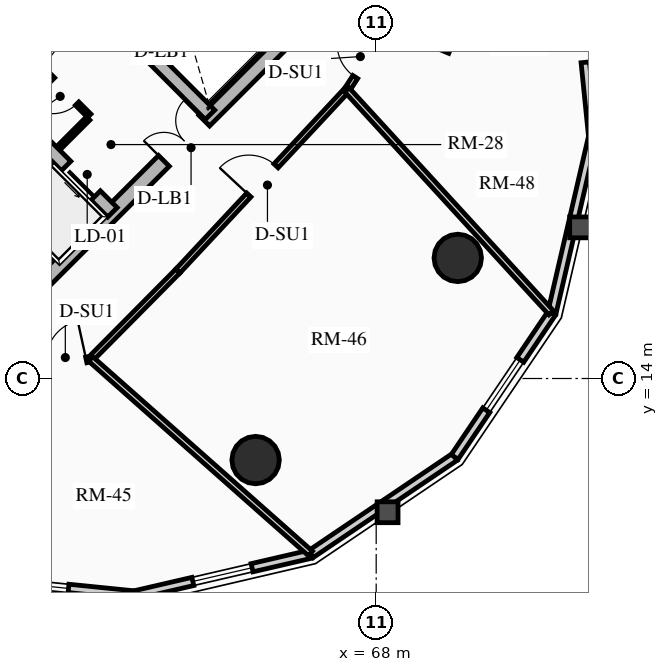
"""IFC4 building model, lengths in metres.
Left out: names, types, materials, properties, quantities, classifications, styles, units other than length and angle.
Written with IfcOpenShell. Run it as: python <this file> out.ifc"""

import sys

from ifc_helpers import new_model, si_unit, direction, frame, frame_2d, origin, origin_2d, place, context, subcontext, project, spatial, rectangle, circle, extrude, source, transform, mapped, element, fill, save


model = new_model("IFC4")
c1 = context("Model", 3, precision=1e-05, world=origin(), true_north=direction((0.0, 1.0)))
c2 = subcontext(c1, "Body", "Model", "MODEL_VIEW")
j1 = project(units=[si_unit("LENGTHUNIT", "METRE"), si_unit("PLANEANGLEUNIT", "RADIAN")], contexts=[c1])
p1 = place(None, origin())
s1 = spatial("IfcSite", under=j1, at=p1, CompositionType="ELEMENT")
p2 = place(p1, origin())
s2 = spatial("IfcBuilding", under=s1, at=p2, CompositionType="ELEMENT")
p3 = place(p2, frame((0.0, 0.0, 154.51)))
s3 = spatial("IfcBuildingStorey", under=s2, at=p3, CompositionType="ELEMENT", Elevation=154.51)
p4 = place(p3, frame((58.561, 15.873, 0.0), z_axis=(0.0, 0.0, 1.0), x_axis=(0.707106781187, 0.707106781187, 0.0)))
e1 = element("IfcWall", 1, at=p4, inside=s3, PredefinedType="SHEAR", context=c2, shape_type="SweptSolid", body=[
    extrude(rectangle(XDim=10.7, YDim=0.4, at=frame_2d((5.35, 0.0))), origin(), (0.0, 0.0, 1.0), 2.91),
])
m1 = source(origin(), c2, "Body", "SweptSolid", [
    extrude(rectangle(XDim=1.5, YDim=2.02, at=frame_2d((0.75, 1.01))), frame((0.0, 0.21, 0.0), z_axis=(0.0, -1.0, 0.0), x_axis=(1.0, 0.0, 0.0)), (0.0, 0.0, 1.0), 0.42),
])
p5 = place(p4, frame((5.45, 0.0, 0.0)))
e2 = element("IfcOpeningElement", 2, at=p5, cuts=e1, PredefinedType="OPENING", context=c2, shape_type="MappedRepresentation", body=[
    mapped(m1, transform((0.0, 0.0, 0.0), x_axis=(1.0, 0.0, 0.0), y_axis=(0.0, 1.0, 0.0), z_axis=(0.0, 0.0, 1.0), scale=1.0)),
])
p6 = place(p3, frame((61.06, 18.373, 0.0), z_axis=(0.0, 0.0, 1.0), x_axis=(-0.707106781187, 0.707106781187, 0.0)))
e3 = element("IfcWall", 3, at=p6, inside=s3, PredefinedType="SHEAR", context=c2, shape_type="SweptSolid", body=[
    extrude(rectangle(XDim=13.7, YDim=0.35, at=frame_2d((6.85, 0.0))), origin(), (0.0, 0.0, 1.0), 2.91),
])
m2 = source(origin(), c2, "Body", "SweptSolid", [
    extrude(rectangle(XDim=1.1, YDim=2.015, at=frame_2d((0.55, 1.007))), frame((0.0, 0.185, 0.0), z_axis=(0.0, -1.0, 0.0), x_axis=(1.0, 0.0, 0.0)), (0.0, 0.0, 1.0), 0.37),
])
p7 = place(p6, frame((4.85, 0.0, 0.0)))
e4 = element("IfcOpeningElement", 4, at=p7, cuts=e3, PredefinedType="OPENING", context=c2, shape_type="MappedRepresentation", body=[
    mapped(m2, transform((0.0, 0.0, 0.0), x_axis=(1.0, 0.0, 0.0), y_axis=(0.0, 1.0, 0.0), z_axis=(0.0, 0.0, 1.0), scale=1.0)),
])
p8 = place(p6, frame((0.625, 0.0, 0.0)))
e5 = element("IfcOpeningElement", 5, at=p8, cuts=e3, PredefinedType="OPENING", context=c2, shape_type="MappedRepresentation", body=[
    mapped(m2, transform((0.0, 0.0, 0.0), x_axis=(1.0, 0.0, 0.0), y_axis=(0.0, 1.0, 0.0), z_axis=(0.0, 0.0, 1.0), scale=1.0)),
])
p9 = place(p6, frame((2.625, 0.0, 0.0)))
e6 = element("IfcOpeningElement", 6, at=p9, cuts=e3, PredefinedType="OPENING", context=c2, shape_type="MappedRepresentation", body=[
    mapped(m2, transform((0.0, 0.0, 0.0), x_axis=(1.0, 0.0, 0.0), y_axis=(0.0, 1.0, 0.0), z_axis=(0.0, 0.0, 1.0), scale=1.0)),
])
m3 = source(origin(), c2, "Body", "SweptSolid", [
    extrude(rectangle(XDim=1.15, YDim=2.02, at=frame_2d((0.575, 1.01))), frame((0.0, 0.185, 0.0), z_axis=(0.0, -1.0, 0.0), x_axis=(1.0, 0.0, 0.0)), (0.0, 0.0, 1.0), 0.37),
])
p10 = place(p6, frame((7.27, 0.0, 0.0)))
e7 = element("IfcOpeningElement", 7, at=p10, cuts=e3, PredefinedType="OPENING", context=c2, shape_type="MappedRepresentation", body=[
    mapped(m3, transform((0.0, 0.0, 0.0), x_axis=(1.0, 0.0, 0.0), y_axis=(0.0, 1.0, 0.0), z_axis=(0.0, 0.0, 1.0), scale=1.0)),
])
p11 = place(p3, frame((63.627, 20.94, 0.0), z_axis=(0.0, 0.0, 1.0), x_axis=(-0.707119496762, 0.707094065383, 0.0)))
e8 = element("IfcWall", 8, at=p11, inside=s3, PredefinedType="SHEAR", context=c2, shape_type="SweptSolid", body=[
    extrude(rectangle(XDim=9.6, YDim=0.35, at=frame_2d((4.8, 0.0))), origin(), (0.0, 0.0, 1.0), 2.91),
])
p12 = place(p11, frame((5.28, 0.0, 0.0)))
e9 = element("IfcOpeningElement", 9, at=p12, cuts=e8, PredefinedType="OPENING", context=c2, shape_type="MappedRepresentation", body=[
    mapped(m3, transform((0.0, 0.0, 0.0), x_axis=(1.0, 0.0, 0.0), y_axis=(0.0, 1.0, 0.0), z_axis=(0.0, 0.0, 1.0), scale=1.0)),
])
for number, where, z_axis, x_axis in (
    (10, (64.827, 11.854, 0.0), (0.0, 0.0, 1.0), (1.0, 0.0, 0.0)),
    (11, (70.146, 17.173, 0.0), (0.0, 0.0, 1.0), (1.0, 0.0, 0.0)),
):
    element("IfcColumn", number, at=place(p3, frame(where, z_axis=z_axis, x_axis=x_axis)), inside=s3, PredefinedType="USERDEFINED", context=c2, shape_type="SweptSolid", body=[
        extrude(circle(Radius=0.625, at=origin_2d()), origin(), (0.0, 0.0, 1.0), 2.91),
    ])
p13 = place(p3, frame((61.633, 8.302, 0.0), z_axis=(0.0, 0.0, 1.0), x_axis=(-0.994959267396, 0.100279889424, 0.0)))
e12 = element("IfcWall", 12, at=p13, inside=s3, PredefinedType="SOLIDWALL", context=c2, shape_type="SweptSolid", body=[
    extrude(rectangle(XDim=5.076, YDim=0.22, at=frame_2d((2.538, 0.0))), origin(), (0.0, 0.0, 1.0), 2.245),
])
m4 = source(origin(), c2, "Body", "SweptSolid", [
    extrude(rectangle(XDim=1.6, YDim=1.3, at=frame_2d((0.8, 0.65))), frame((0.0, 0.12, 0.0), z_axis=(0.0, -1.0, 0.0), x_axis=(1.0, 0.0, 0.0)), (0.0, 0.0, 1.0), 0.24),
])
p14 = place(p13, frame((1.738, 0.0, 0.65)))
e13 = element("IfcOpeningElement", 13, at=p14, cuts=e12, PredefinedType="OPENING", context=c2, shape_type="MappedRepresentation", body=[
    mapped(m4, transform((0.0, 0.0, 0.0), x_axis=(1.0, 0.0, 0.0), y_axis=(0.0, 1.0, 0.0), z_axis=(0.0, 0.0, 1.0), scale=1.0)),
])
p15 = place(p3, frame((66.279, 9.378, 0.0), z_axis=(0.0, 0.0, 1.0), x_axis=(-0.974206226622, -0.225659540039, 0.0)))
e14 = element("IfcWall", 14, at=p15, inside=s3, PredefinedType="SOLIDWALL", context=c2, shape_type="SweptSolid", body=[
    extrude(rectangle(XDim=4.769, YDim=0.22, at=frame_2d((2.385, 0.0))), origin(), (0.0, 0.0, 1.0), 2.245),
])
p16 = place(p15, frame((1.585, 0.0, 0.65)))
e15 = element("IfcOpeningElement", 15, at=p16, cuts=e14, PredefinedType="OPENING", context=c2, shape_type="MappedRepresentation", body=[
    mapped(m4, transform((0.0, 0.0, 0.0), x_axis=(1.0, 0.0, 0.0), y_axis=(0.0, 1.0, 0.0), z_axis=(0.0, 0.0, 1.0), scale=1.0)),
])
p17 = place(p3, frame((70.065, 11.935, 0.0), z_axis=(0.0, 0.0, 1.0), x_axis=(-0.828739009952, -0.559635286042, 0.0)))
e16 = element("IfcWall", 16, at=p17, inside=s3, PredefinedType="SOLIDWALL", context=c2, shape_type="SweptSolid", body=[
    extrude(rectangle(XDim=4.569, YDim=0.22, at=frame_2d((2.284, 0.0))), origin(), (0.0, 0.0, 1.0), 2.245),
])
p18 = place(p3, frame((72.622, 15.721, 0.0), z_axis=(0.0, 0.0, 1.0), x_axis=(-0.559635286042, -0.828739009952, 0.0)))
e17 = element("IfcWall", 17, at=p18, inside=s3, PredefinedType="SOLIDWALL", context=c2, shape_type="SweptSolid", body=[
    extrude(rectangle(XDim=4.569, YDim=0.22, at=frame_2d((2.284, 0.0))), origin(), (0.0, 0.0, 1.0), 2.245),
])
p19 = place(p18, frame((1.484, 0.0, 0.65)))
e18 = element("IfcOpeningElement", 18, at=p19, cuts=e17, PredefinedType="OPENING", context=c2, shape_type="MappedRepresentation", body=[
    mapped(m4, transform((0.0, 0.0, 0.0), x_axis=(1.0, 0.0, 0.0), y_axis=(0.0, 1.0, 0.0), z_axis=(0.0, 0.0, 1.0), scale=1.0)),
])
p20 = place(p3, frame((73.698, 20.367, 0.0), z_axis=(0.0, 0.0, 1.0), x_axis=(-0.225659540039, -0.974206226622, 0.0)))
e19 = element("IfcWall", 19, at=p20, inside=s3, PredefinedType="SOLIDWALL", context=c2, shape_type="SweptSolid", body=[
    extrude(rectangle(XDim=4.769, YDim=0.22, at=frame_2d((2.385, 0.0))), origin(), (0.0, 0.0, 1.0), 2.245),
])
p21 = place(p3, frame((73.189, 25.418, 0.0), z_axis=(0.0, 0.0, 1.0), x_axis=(0.100279889424, -0.994959267396, 0.0)))
e20 = element("IfcWall", 20, at=p21, inside=s3, PredefinedType="SOLIDWALL", context=c2, shape_type="SweptSolid", body=[
    extrude(rectangle(XDim=5.076, YDim=0.22, at=frame_2d((2.538, 0.0))), origin(), (0.0, 0.0, 1.0), 2.245),
])
m5 = source(origin(), c2, "Body", "SweptSolid", [
    extrude(rectangle(XDim=1.15, YDim=2.005, at=frame_2d((0.575, 1.002))), frame((0.0, 0.12, 0.0), z_axis=(0.0, -1.0, 0.0), x_axis=(1.0, 0.0, 0.0)), (0.0, 0.0, 1.0), 0.24),
])
p22 = place(p21, frame((1.963, 0.0, 0.0)))
e21 = element("IfcOpeningElement", 21, at=p22, cuts=e20, PredefinedType="OPENING", context=c2, shape_type="MappedRepresentation", body=[
    mapped(m5, transform((0.0, 0.0, 0.0), x_axis=(1.0, 0.0, 0.0), y_axis=(0.0, 1.0, 0.0), z_axis=(0.0, 0.0, 1.0), scale=1.0)),
])
p23 = place(p3, frame((58.214, 21.467, 0.0), z_axis=(0.0, 0.0, 1.0), x_axis=(0.707106781187, 0.707106781187, 0.0)))
e22 = element("IfcWall", 22, at=p23, inside=s3, PredefinedType="PARTITIONING", context=c2, shape_type="SweptSolid", body=[
    extrude(rectangle(XDim=3.28, YDim=0.2, at=frame_2d((1.64, 0.0))), origin(), (0.0, 0.0, 1.0), 2.675),
])
m6 = source(origin(), c2, "Body", "SweptSolid", [
    extrude(rectangle(XDim=1.5, YDim=2.02, at=frame_2d((0.75, 1.01))), frame((0.0, 0.11, 0.0), z_axis=(0.0, -1.0, 0.0), x_axis=(1.0, 0.0, 0.0)), (0.0, 0.0, 1.0), 0.22),
])
p24 = place(p23, frame((1.55, 0.0, 0.0)))
e23 = element("IfcOpeningElement", 23, at=p24, cuts=e22, PredefinedType="OPENING", context=c2, shape_type="MappedRepresentation", body=[
    mapped(m6, transform((0.0, 0.0, 0.0), x_axis=(1.0, 0.0, 0.0), y_axis=(0.0, 1.0, 0.0), z_axis=(0.0, 0.0, 1.0), scale=1.0)),
])
p25 = place(p3, frame((60.448, 20.915, 0.0), z_axis=(0.0, 0.0, 1.0), x_axis=(-0.707106781187, 0.707106781187, 0.0)))
e24 = element("IfcWall", 24, at=p25, inside=s3, PredefinedType="PARTITIONING", context=c2, shape_type="SweptSolid", body=[
    extrude(rectangle(XDim=1.87, YDim=0.125, at=frame_2d((0.935, 0.0))), origin(), (0.0, 0.0, 1.0), 2.675),
])
m7 = source(origin(), c2, "Body", "SweptSolid", [
    extrude(rectangle(XDim=0.9, YDim=2.005, at=frame_2d((0.45, 1.002))), frame((0.0, 0.073, 0.0), z_axis=(0.0, -1.0, 0.0), x_axis=(1.0, 0.0, 0.0)), (0.0, 0.0, 1.0), 0.145),
])
p26 = place(p25, frame((0.45, 0.0, 0.0)))
e25 = element("IfcOpeningElement", 25, at=p26, cuts=e24, PredefinedType="OPENING", context=c2, shape_type="MappedRepresentation", body=[
    mapped(m7, transform((0.0, 0.0, 0.0), x_axis=(1.0, 0.0, 0.0), y_axis=(0.0, 1.0, 0.0), z_axis=(0.0, 0.0, 1.0), scale=1.0)),
])
p27 = place(p3, frame((59.643, 20.066, 0.0), z_axis=(0.0, 0.0, 1.0), x_axis=(0.707106781187, 0.707106781187, 0.0)))
e26 = element("IfcWall", 26, at=p27, inside=s3, PredefinedType="PARTITIONING", context=c2, shape_type="SweptSolid", body=[
    extrude(rectangle(XDim=1.1, YDim=0.125, at=frame_2d((0.55, 0.0))), origin(), (0.0, 0.0, 1.0), 2.675),
])
p28 = place(p3, frame((58.963, 14.18, 0.0), z_axis=(0.0, 0.0, 1.0), x_axis=(0.976826524015, 0.214032572243, 0.0)))
e27 = element("IfcWall", 27, at=p28, inside=s3, PredefinedType="PARTITIONING", context=c2, shape_type="SweptSolid", body=[
    extrude(rectangle(XDim=1.562, YDim=0.15, at=frame_2d((0.781, 0.0))), origin(), (0.0, 0.0, 1.0), 2.245),
])
m8 = source(origin(), c2, "Body", "SweptSolid", [
    extrude(rectangle(XDim=1.05, YDim=2.015, at=frame_2d((0.525, 1.007))), frame((0.0, 0.085, 0.0), z_axis=(0.0, -1.0, 0.0), x_axis=(1.0, 0.0, 0.0)), (0.0, 0.0, 1.0), 0.17),
])
p29 = place(p28, frame((0.392, 0.0, 0.0)))
e28 = element("IfcOpeningElement", 28, at=p29, cuts=e27, PredefinedType="OPENING", context=c2, shape_type="MappedRepresentation", body=[
    mapped(m8, transform((0.0, 0.0, 0.0), x_axis=(1.0, 0.0, 0.0), y_axis=(0.0, 1.0, 0.0), z_axis=(0.0, 0.0, 1.0), scale=1.0)),
])
p30 = place(p3, frame((60.488, 14.514, 0.0), z_axis=(0.0, 0.0, 1.0), x_axis=(0.703880260405, 0.71031864611, 0.0)))
e29 = element("IfcWall", 29, at=p30, inside=s3, PredefinedType="PARTITIONING", context=c2, shape_type="SweptSolid", body=[
    extrude(rectangle(XDim=3.261, YDim=0.15, at=frame_2d((1.63, 0.0))), origin(), (0.0, 0.0, 1.0), 2.245),
])
p31 = place(p3, frame((62.784, 16.83, 0.0), z_axis=(0.0, 0.0, 1.0), x_axis=(0.682240832942, 0.731127516831, 0.0)))
e30 = element("IfcWall", 30, at=p31, inside=s3, PredefinedType="PARTITIONING", context=c2, shape_type="SweptSolid", body=[
    extrude(rectangle(XDim=6.517, YDim=0.15, at=frame_2d((3.259, 0.0))), origin(), (0.0, 0.0, 1.0), 2.245),
])
p32 = place(p31, frame((2.734, 0.0, 0.0)))
e31 = element("IfcOpeningElement", 31, at=p32, cuts=e30, PredefinedType="OPENING", context=c2, shape_type="MappedRepresentation", body=[
    mapped(m8, transform((0.0, 0.0, 0.0), x_axis=(1.0, 0.0, 0.0), y_axis=(0.0, 1.0, 0.0), z_axis=(0.0, 0.0, 1.0), scale=1.0)),
])
p33 = place(p3, frame((67.23, 21.595, 0.0), z_axis=(0.0, 0.0, 1.0), x_axis=(0.543687770222, 0.839287560084, 0.0)))
e32 = element("IfcWall", 32, at=p33, inside=s3, PredefinedType="PARTITIONING", context=c2, shape_type="SweptSolid", body=[
    extrude(rectangle(XDim=1.855, YDim=0.15, at=frame_2d((0.927, 0.0))), origin(), (0.0, 0.0, 1.0), 2.245),
])
p34 = place(p33, frame((0.402, 0.0, 0.0)))
e33 = element("IfcOpeningElement", 33, at=p34, cuts=e32, PredefinedType="OPENING", context=c2, shape_type="MappedRepresentation", body=[
    mapped(m8, transform((0.0, 0.0, 0.0), x_axis=(1.0, 0.0, 0.0), y_axis=(0.0, 1.0, 0.0), z_axis=(0.0, 0.0, 1.0), scale=1.0)),
])
p35 = place(p3, frame((60.488, 14.514, 0.0), z_axis=(0.0, 0.0, 1.0), x_axis=(0.748740614849, -0.662863101761, 0.0)))
e34 = element("IfcWall", 34, at=p35, inside=s3, PredefinedType="PARTITIONING", context=c2, shape_type="SweptSolid", body=[
    extrude(rectangle(XDim=7.721, YDim=0.16, at=frame_2d((3.861, 0.0))), origin(), (0.0, 0.0, 1.0), 2.245),
])
p36 = place(p3, frame((67.23, 21.595, 0.0), z_axis=(0.0, 0.0, 1.0), x_axis=(0.67560509773, -0.737263692258, 0.0)))
e35 = element("IfcWall", 35, at=p36, inside=s3, PredefinedType="PARTITIONING", context=c2, shape_type="SweptSolid", body=[
    extrude(rectangle(XDim=7.955, YDim=0.16, at=frame_2d((3.978, 0.0))), origin(), (0.0, 0.0, 1.0), 2.245),
])
p37 = place(p3, frame((68.367, 23.271, 0.0), z_axis=(0.0, 0.0, 1.0), x_axis=(0.922420747941, -0.386186436541, 0.0)))
e36 = element("IfcWall", 36, at=p37, inside=s3, PredefinedType="PARTITIONING", context=c2, shape_type="SweptSolid", body=[
    extrude(rectangle(XDim=1.699, YDim=0.125, at=frame_2d((0.849, 0.0))), origin(), (0.0, 0.0, 1.0), 2.675),
])
m9 = source(origin(), c2, "Body", "SweptSolid", [
    extrude(rectangle(XDim=1.6, YDim=1.3, at=frame_2d((0.8, 0.65))), frame((0.0, 0.03, 0.0), z_axis=(0.0, -1.0, 0.0), x_axis=(1.0, 0.0, 0.0)), (0.0, 0.0, 1.0), 0.06),
])
p38 = place(p14, origin())
e37 = element("IfcWindow", 37, at=p38, inside=s3, PartitioningType="SINGLE_PANEL", PredefinedType="WINDOW", context=c2, shape_type="MappedRepresentation", body=[
    mapped(m9, transform((0.0, 0.0, 0.0), x_axis=(1.0, 0.0, 0.0), y_axis=(0.0, 1.0, 0.0), z_axis=(0.0, 0.0, 1.0), scale=1.0)),
])
fill(e13, e37)
p39 = place(p16, origin())
e38 = element("IfcWindow", 38, at=p39, inside=s3, PartitioningType="SINGLE_PANEL", PredefinedType="WINDOW", context=c2, shape_type="MappedRepresentation", body=[
    mapped(m9, transform((0.0, 0.0, 0.0), x_axis=(1.0, 0.0, 0.0), y_axis=(0.0, 1.0, 0.0), z_axis=(0.0, 0.0, 1.0), scale=1.0)),
])
fill(e15, e38)
p40 = place(p19, origin())
e39 = element("IfcWindow", 39, at=p40, inside=s3, PartitioningType="SINGLE_PANEL", PredefinedType="WINDOW", context=c2, shape_type="MappedRepresentation", body=[
    mapped(m9, transform((0.0, 0.0, 0.0), x_axis=(1.0, 0.0, 0.0), y_axis=(0.0, 1.0, 0.0), z_axis=(0.0, 0.0, 1.0), scale=1.0)),
])
fill(e18, e39)
m10 = source(origin(), c2, "Body", "SweptSolid", [
    extrude(rectangle(XDim=1.15, YDim=2.005, at=frame_2d((0.575, 1.002))), frame((0.0, 0.025, 0.0), z_axis=(0.0, -1.0, 0.0), x_axis=(1.0, 0.0, 0.0)), (0.0, 0.0, 1.0), 0.05),
])
p41 = place(p22, origin())
e40 = element("IfcDoor", 40, at=p41, inside=s3, OperationType="SINGLE_SWING_LEFT", PredefinedType="DOOR", context=c2, shape_type="MappedRepresentation", body=[
    mapped(m10, transform((0.0, 0.0, 0.0), x_axis=(1.0, 0.0, 0.0), y_axis=(0.0, 1.0, 0.0), z_axis=(0.0, 0.0, 1.0), scale=1.0)),
])
fill(e21, e40)
m11 = source(origin(), c2, "Body", "SweptSolid", [
    extrude(rectangle(XDim=1.1, YDim=2.015, at=frame_2d((0.55, 1.007))), frame((0.0, 0.025, 0.0), z_axis=(0.0, -1.0, 0.0), x_axis=(1.0, 0.0, 0.0)), (0.0, 0.0, 1.0), 0.05),
])
p42 = place(p8, origin())
e41 = element("IfcDoor", 41, at=p42, inside=s3, OperationType="SLIDING_TO_LEFT", PredefinedType="DOOR", context=c2, shape_type="MappedRepresentation", body=[
    mapped(m11, transform((0.0, 0.0, 0.0), x_axis=(1.0, 0.0, 0.0), y_axis=(0.0, 1.0, 0.0), z_axis=(0.0, 0.0, 1.0), scale=1.0)),
])
fill(e5, e41)
m12 = source(origin(), c2, "Body", "SweptSolid", [
    extrude(rectangle(XDim=1.5, YDim=2.02, at=frame_2d((0.75, 1.01))), frame((0.0, 0.025, 0.0), z_axis=(0.0, -1.0, 0.0), x_axis=(1.0, 0.0, 0.0)), (0.0, 0.0, 1.0), 0.05),
])
p43 = place(p5, origin())
e42 = element("IfcDoor", 42, at=p43, inside=s3, OperationType="DOUBLE_DOOR_SINGLE_SWING", PredefinedType="DOOR", context=c2, shape_type="MappedRepresentation", body=[
    mapped(m12, transform((0.0, 0.0, 0.0), x_axis=(1.0, 0.0, 0.0), y_axis=(0.0, 1.0, 0.0), z_axis=(0.0, 0.0, 1.0), scale=1.0)),
])
fill(e2, e42)
p44 = place(p24, origin())
e43 = element("IfcDoor", 43, at=p44, inside=s3, OperationType="DOUBLE_DOOR_SINGLE_SWING", PredefinedType="DOOR", context=c2, shape_type="MappedRepresentation", body=[
    mapped(m12, transform((0.0, 0.0, 0.0), x_axis=(1.0, 0.0, 0.0), y_axis=(0.0, 1.0, 0.0), z_axis=(0.0, 0.0, 1.0), scale=1.0)),
])
fill(e23, e43)
m13 = source(origin(), c2, "Body", "SweptSolid", [
    extrude(rectangle(XDim=0.9, YDim=2.005, at=frame_2d((0.45, 1.002))), frame((0.0, 0.025, 0.0), z_axis=(0.0, -1.0, 0.0), x_axis=(1.0, 0.0, 0.0)), (0.0, 0.0, 1.0), 0.05),
])
p45 = place(p26, origin())
e44 = element("IfcDoor", 44, at=p45, inside=s3, OperationType="SINGLE_SWING_RIGHT", PredefinedType="DOOR", context=c2, shape_type="MappedRepresentation", body=[
    mapped(m13, transform((0.0, 0.0, 0.0), x_axis=(1.0, 0.0, 0.0), y_axis=(0.0, 1.0, 0.0), z_axis=(0.0, 0.0, 1.0), scale=1.0)),
])
fill(e25, e44)
m14 = source(origin(), c2, "Body", "SweptSolid", [
    extrude(rectangle(XDim=1.05, YDim=2.015, at=frame_2d((0.525, 1.007))), frame((0.0, 0.025, 0.0), z_axis=(0.0, -1.0, 0.0), x_axis=(1.0, 0.0, 0.0)), (0.0, 0.0, 1.0), 0.05),
])
p46 = place(p29, origin())
e45 = element("IfcDoor", 45, at=p46, inside=s3, OperationType="SINGLE_SWING_RIGHT", PredefinedType="DOOR", context=c2, shape_type="MappedRepresentation", body=[
    mapped(m14, transform((0.0, 0.0, 0.0), x_axis=(1.0, 0.0, 0.0), y_axis=(0.0, 1.0, 0.0), z_axis=(0.0, 0.0, 1.0), scale=1.0)),
])
fill(e28, e45)
p47 = place(p32, origin())
e46 = element("IfcDoor", 46, at=p47, inside=s3, OperationType="SINGLE_SWING_LEFT", PredefinedType="DOOR", context=c2, shape_type="MappedRepresentation", body=[
    mapped(m14, transform((0.0, 0.0, 0.0), x_axis=(1.0, 0.0, 0.0), y_axis=(0.0, 1.0, 0.0), z_axis=(0.0, 0.0, 1.0), scale=1.0)),
])
fill(e31, e46)
p48 = place(p34, origin())
e47 = element("IfcDoor", 47, at=p48, inside=s3, OperationType="SINGLE_SWING_RIGHT", PredefinedType="DOOR", context=c2, shape_type="MappedRepresentation", body=[
    mapped(m14, transform((0.0, 0.0, 0.0), x_axis=(1.0, 0.0, 0.0), y_axis=(0.0, 1.0, 0.0), z_axis=(0.0, 0.0, 1.0), scale=1.0)),
])
fill(e33, e47)
save(model, sys.argv[1])
